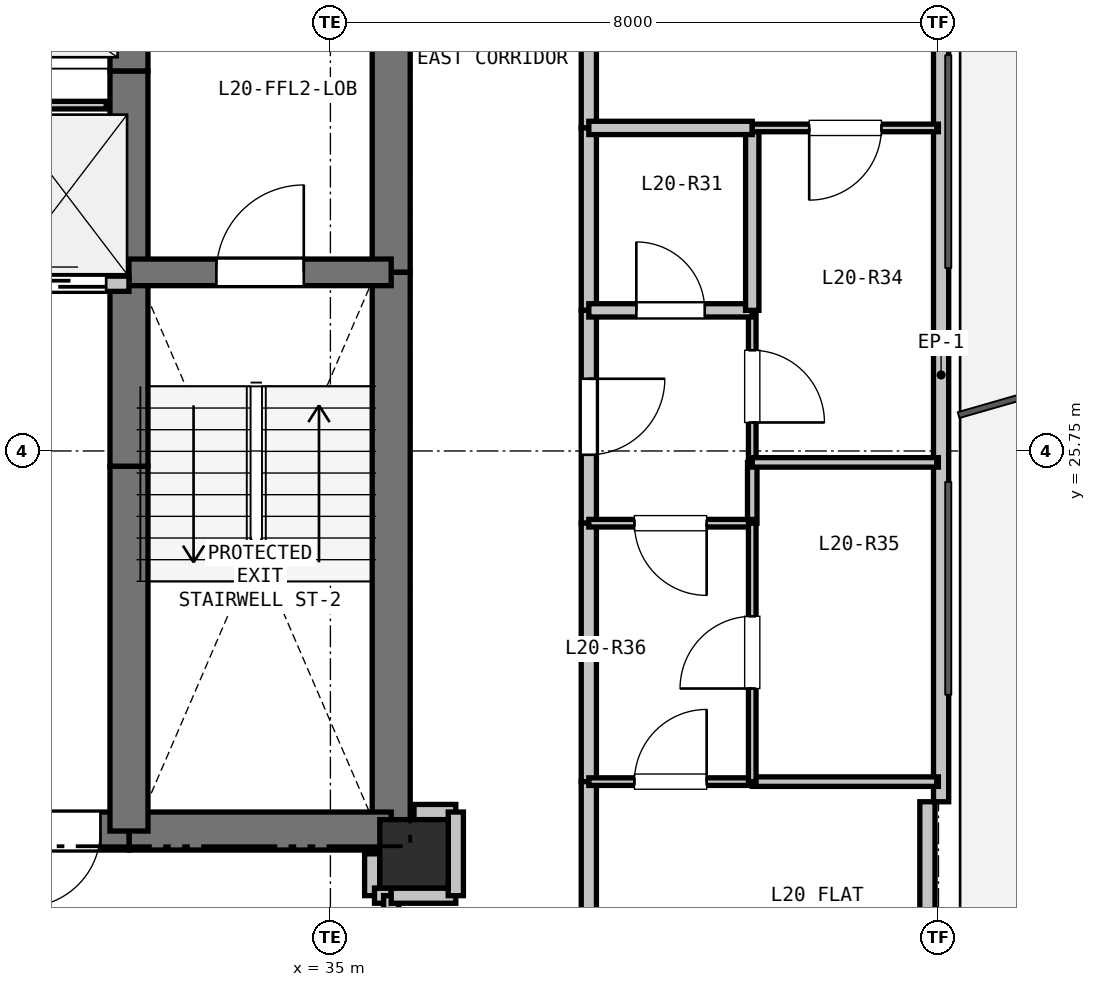
"""IFC4 building model, lengths in metres.
Left out: names, types, materials, properties, quantities, classifications, styles, units other than length and angle.
Written with IfcOpenShell. Run it as: python <this file> out.ifc"""

import sys

from ifc_helpers import new_model, si_unit, direction, frame, frame_2d, origin, origin_2d, place, context, subcontext, project, spatial, rectangle, extrude, element, fill, save


model = new_model("IFC4")
c1 = context("Model", 3, precision=1e-05, world=origin(), true_north=direction((0.0, 1.0)))
c2 = subcontext(c1, "Body", "Model", "MODEL_VIEW")
j1 = project(units=[si_unit("LENGTHUNIT", "METRE"), si_unit("PLANEANGLEUNIT", "RADIAN")], contexts=[c1])
p1 = place(None, origin())
s1 = spatial("IfcSite", under=j1, at=p1, CompositionType="ELEMENT")
p2 = place(p1, origin())
s2 = spatial("IfcBuilding", under=s1, at=p2, CompositionType="ELEMENT")
p3 = place(p2, frame((0.0, 0.0, 76.8)))
s3 = spatial("IfcBuildingStorey", under=s2, at=p3, CompositionType="ELEMENT", Elevation=76.8)
p4 = place(p3, frame((36.1, 20.45, 0.0), z_axis=(0.0, 0.0, 1.0), x_axis=(1.0, 0.0, 0.0)))
e1 = element("IfcColumn", 1, at=p4, inside=s3, PredefinedType="COLUMN", context=c2, shape_type="SweptSolid", body=[
    extrude(rectangle(XDim=0.9, YDim=0.9, at=origin_2d()), origin(), (0.0, 0.0, 1.0), 3.3),
])
p5 = place(p3, frame((43.035, 32.365, 0.0), z_axis=(0.0, 0.0, 1.0), x_axis=(0.0, -1.0, 0.0)))
e2 = element("IfcWall", 2, at=p5, inside=s3, PredefinedType="PARAPET", context=c2, shape_type="SweptSolid", body=[
    extrude(rectangle(XDim=11.229, YDim=0.2, at=frame_2d((5.615, 0.0))), origin(), (0.0, 0.0, 1.0), 0.2),
])
p6 = place(p3, frame((42.854, 21.135, 0.0), z_axis=(0.0, 0.0, 1.0), x_axis=(0.0, -1.0, 0.0)))
e3 = element("IfcWall", 3, at=p6, inside=s3, PredefinedType="PARAPET", context=c2, shape_type="SweptSolid", body=[
    extrude(rectangle(XDim=1.7, YDim=0.2, at=frame_2d((0.85, 0.0))), origin(), (0.0, 0.0, 1.0), 2.67),
])
p7 = place(p3, frame((35.8, 32.75, 0.0), z_axis=(0.0, 0.0, 1.0), x_axis=(0.0, -1.0, 0.0)))
e4 = element("IfcWall", 4, at=p7, inside=s3, PredefinedType="SHEAR", context=c2, shape_type="SweptSolid", body=[
    extrude(rectangle(XDim=4.65, YDim=0.5, at=frame_2d((2.325, 0.0))), origin(), (0.0, 0.0, 1.0), 3.05),
])
p8 = place(p3, frame((35.8, 28.1, 0.0), z_axis=(0.0, 0.0, 1.0), x_axis=(0.0, -1.0, 0.0)))
e5 = element("IfcWall", 5, at=p8, inside=s3, PredefinedType="SHEAR", context=c2, shape_type="SweptSolid", body=[
    extrude(rectangle(XDim=7.35, YDim=0.5, at=frame_2d((3.675, 0.0))), origin(), (0.0, 0.0, 1.0), 3.05),
])
p9 = place(p3, frame((35.8, 20.75, 0.0), z_axis=(0.0, 0.0, 1.0), x_axis=(-1.0, 0.0, 0.0)))
e6 = element("IfcWall", 6, at=p9, inside=s3, PredefinedType="SHEAR", context=c2, shape_type="SweptSolid", body=[
    extrude(rectangle(XDim=3.45, YDim=0.5, at=frame_2d((1.725, 0.0))), origin(), (0.0, 0.0, 1.0), 3.05),
])
p10 = place(p3, frame((32.35, 20.75, 0.0), z_axis=(0.0, 0.0, 1.0), x_axis=(-1.0, 0.0, 0.0)))
e7 = element("IfcWall", 7, at=p10, inside=s3, PredefinedType="SHEAR", context=c2, shape_type="SweptSolid", body=[
    extrude(rectangle(XDim=1.75, YDim=0.5, at=frame_2d((0.875, 0.0))), origin(), (0.0, 0.0, 1.0), 3.05),
])
p11 = place(p10, frame((0.375, 0.0, 0.0)))
e8 = element("IfcOpeningElement", 8, at=p11, cuts=e7, PredefinedType="OPENING", context=c2, shape_type="SweptSolid", body=[
    extrude(rectangle(XDim=1.0, YDim=2.15, at=frame_2d((0.5, 1.075))), frame((0.0, 0.26, 0.0), z_axis=(0.0, -1.0, 0.0), x_axis=(1.0, 0.0, 0.0)), (0.0, 0.0, 1.0), 0.52),
])
p12 = place(p3, frame((32.35, 20.75, 0.0), z_axis=(0.0, 0.0, 1.0), x_axis=(0.0, 1.0, 0.0)))
e9 = element("IfcWall", 9, at=p12, inside=s3, PredefinedType="SHEAR", context=c2, shape_type="SweptSolid", body=[
    extrude(rectangle(XDim=4.8, YDim=0.5, at=frame_2d((2.4, 0.0))), origin(), (0.0, 0.0, 1.0), 3.05),
])
p13 = place(p3, frame((32.35, 25.55, 0.0), z_axis=(0.0, 0.0, 1.0), x_axis=(0.0, 1.0, 0.0)))
e10 = element("IfcWall", 10, at=p13, inside=s3, PredefinedType="SHEAR", context=c2, shape_type="SweptSolid", body=[
    extrude(rectangle(XDim=2.4, YDim=0.5, at=frame_2d((1.2, 0.0))), origin(), (0.0, 0.0, 1.0), 3.05),
])
p14 = place(p3, frame((32.35, 27.95, 0.0), z_axis=(0.0, 0.0, 1.0), x_axis=(0.0, 1.0, 0.0)))
e11 = element("IfcWall", 11, at=p14, inside=s3, PredefinedType="SHEAR", context=c2, shape_type="SweptSolid", body=[
    extrude(rectangle(XDim=2.8, YDim=0.5, at=frame_2d((1.4, 0.0))), origin(), (0.0, 0.0, 1.0), 3.05),
])
p15 = place(p3, frame((32.35, 30.75, 0.0), z_axis=(0.0, 0.0, 1.0), x_axis=(0.0, 1.0, 0.0)))
e12 = element("IfcWall", 12, at=p15, inside=s3, PredefinedType="SHEAR", context=c2, shape_type="SweptSolid", body=[
    extrude(rectangle(XDim=2.0, YDim=0.5, at=frame_2d((1.0, 0.0))), origin(), (0.0, 0.0, 1.0), 3.05),
])
p16 = place(p15, frame((0.45, 0.0, 0.0)))
e13 = element("IfcOpeningElement", 13, at=p16, cuts=e12, PredefinedType="OPENING", context=c2, shape_type="SweptSolid", body=[
    extrude(rectangle(XDim=1.1, YDim=2.15, at=frame_2d((0.55, 1.075))), frame((0.0, 0.26, 0.0), z_axis=(0.0, -1.0, 0.0), x_axis=(1.0, 0.0, 0.0)), (0.0, 0.0, 1.0), 0.52),
])
p17 = place(p3, frame((32.35, 28.1, 0.0), z_axis=(0.0, 0.0, 1.0), x_axis=(1.0, 0.0, 0.0)))
e14 = element("IfcWall", 14, at=p17, inside=s3, PredefinedType="SHEAR", context=c2, shape_type="SweptSolid", body=[
    extrude(rectangle(XDim=3.45, YDim=0.35, at=frame_2d((1.725, 0.0))), origin(), (0.0, 0.0, 1.0), 3.05),
])
p18 = place(p17, frame((1.15, 0.0, 0.0)))
e15 = element("IfcOpeningElement", 15, at=p18, cuts=e14, PredefinedType="OPENING", context=c2, shape_type="SweptSolid", body=[
    extrude(rectangle(XDim=1.15, YDim=2.15, at=frame_2d((0.575, 1.075))), frame((0.0, 0.185, 0.0), z_axis=(0.0, -1.0, 0.0), x_axis=(1.0, 0.0, 0.0)), (0.0, 0.0, 1.0), 0.37),
])
p19 = place(p3, frame((27.4, 27.95, 0.0), z_axis=(0.0, 0.0, 1.0), x_axis=(1.0, 0.0, 0.0)))
e16 = element("IfcWall", 16, at=p19, inside=s3, PredefinedType="PARTITIONING", context=c2, shape_type="SweptSolid", body=[
    extrude(rectangle(XDim=4.95, YDim=0.2, at=frame_2d((2.475, 0.0))), origin(), (0.0, 0.0, 1.0), 3.05),
])
p20 = place(p19, frame((0.25, 0.0, 0.0)))
e17 = element("IfcOpeningElement", 17, at=p20, cuts=e16, PredefinedType="OPENING", context=c2, shape_type="SweptSolid", body=[
    extrude(rectangle(XDim=1.1, YDim=2.15, at=frame_2d((0.55, 1.075))), frame((0.0, 0.11, 0.0), z_axis=(0.0, -1.0, 0.0), x_axis=(1.0, 0.0, 0.0)), (0.0, 0.0, 1.0), 0.22),
])
p21 = place(p19, frame((1.9, 0.0, 0.0)))
e18 = element("IfcOpeningElement", 18, at=p21, cuts=e16, PredefinedType="OPENING", context=c2, shape_type="SweptSolid", body=[
    extrude(rectangle(XDim=1.1, YDim=2.15, at=frame_2d((0.55, 1.075))), frame((0.0, 0.11, 0.0), z_axis=(0.0, -1.0, 0.0), x_axis=(1.0, 0.0, 0.0)), (0.0, 0.0, 1.0), 0.22),
])
p22 = place(p19, frame((3.55, 0.0, 0.0)))
e19 = element("IfcOpeningElement", 19, at=p22, cuts=e16, PredefinedType="OPENING", context=c2, shape_type="SweptSolid", body=[
    extrude(rectangle(XDim=1.1, YDim=2.15, at=frame_2d((0.55, 1.075))), frame((0.0, 0.11, 0.0), z_axis=(0.0, -1.0, 0.0), x_axis=(1.0, 0.0, 0.0)), (0.0, 0.0, 1.0), 0.22),
])
p23 = place(p3, frame((32.05, 30.3, 0.0), z_axis=(0.0, 0.0, 1.0), x_axis=(-1.0, 0.0, 0.0)))
e20 = element("IfcWall", 20, at=p23, inside=s3, PredefinedType="PARTITIONING", context=c2, shape_type="SweptSolid", body=[
    extrude(rectangle(XDim=1.35, YDim=0.1, at=frame_2d((0.675, 0.0))), origin(), (0.0, 0.0, 1.0), 3.05),
])
p24 = place(p3, frame((35.55, 20.45, 0.0), z_axis=(0.0, 0.0, 1.0), x_axis=(0.0, -1.0, 0.0)))
e21 = element("IfcWall", 21, at=p24, inside=s3, PredefinedType="PARTITIONING", context=c2, shape_type="SweptSolid", body=[
    extrude(rectangle(XDim=0.55, YDim=0.2, at=frame_2d((0.275, 0.0))), origin(), (0.0, 0.0, 1.0), 2.498),
])
p25 = place(p3, frame((35.58, 19.9, 0.0), z_axis=(0.0, 0.0, 1.0), x_axis=(1.0, 0.0, 0.0)))
e22 = element("IfcWall", 22, at=p25, inside=s3, PredefinedType="PARTITIONING", context=c2, shape_type="SweptSolid", body=[
    extrude(rectangle(XDim=0.22, YDim=0.2, at=frame_2d((0.11, 0.0))), origin(), (0.0, 0.0, 1.0), 3.05),
])
p26 = place(p3, frame((35.8, 19.9, 0.0), z_axis=(0.0, 0.0, 1.0), x_axis=(0.0, -1.0, 0.0)))
e23 = element("IfcWall", 23, at=p26, inside=s3, PredefinedType="PARTITIONING", context=c2, shape_type="SweptSolid", body=[
    extrude(rectangle(XDim=1.75, YDim=0.2, at=frame_2d((0.875, 0.0))), origin(), (0.0, 0.0, 1.0), 3.05),
])
p27 = place(p26, frame((0.375, 0.0, 0.0)))
e24 = element("IfcOpeningElement", 24, at=p27, cuts=e23, PredefinedType="OPENING", context=c2, shape_type="SweptSolid", body=[
    extrude(rectangle(XDim=1.0, YDim=2.15, at=frame_2d((0.5, 1.075))), frame((0.0, 0.11, 0.0), z_axis=(0.0, -1.0, 0.0), x_axis=(1.0, 0.0, 0.0)), (0.0, 0.0, 1.0), 0.22),
])
p28 = place(p3, frame((36.65, 21.0, 0.0), z_axis=(0.0, 0.0, 1.0), x_axis=(-1.0, 0.0, 0.0)))
e25 = element("IfcWall", 25, at=p28, inside=s3, PredefinedType="PARTITIONING", context=c2, shape_type="SweptSolid", body=[
    extrude(rectangle(XDim=0.55, YDim=0.2, at=frame_2d((0.275, 0.0))), origin(), (0.0, 0.0, 1.0), 2.498),
])
p29 = place(p3, frame((38.4, 35.35, 0.0), z_axis=(0.0, 0.0, 1.0), x_axis=(0.0, -1.0, 0.0)))
e26 = element("IfcWall", 26, at=p29, inside=s3, PredefinedType="PARTITIONING", context=c2, shape_type="SweptSolid", body=[
    extrude(rectangle(XDim=5.35, YDim=0.2, at=frame_2d((2.675, 0.0))), origin(), (0.0, 0.0, 1.0), 3.05),
])
p30 = place(p3, frame((38.4, 30.0, 0.0), z_axis=(0.0, 0.0, 1.0), x_axis=(0.0, -1.0, 0.0)))
e27 = element("IfcWall", 27, at=p30, inside=s3, PredefinedType="PARTITIONING", context=c2, shape_type="SweptSolid", body=[
    extrude(rectangle(XDim=2.4, YDim=0.2, at=frame_2d((1.2, 0.0))), origin(), (0.0, 0.0, 1.0), 3.05),
])
p31 = place(p3, frame((38.4, 27.6, 0.0), z_axis=(0.0, 0.0, 1.0), x_axis=(0.0, -1.0, 0.0)))
e28 = element("IfcWall", 28, at=p31, inside=s3, PredefinedType="PARTITIONING", context=c2, shape_type="SweptSolid", body=[
    extrude(rectangle(XDim=2.8, YDim=0.2, at=frame_2d((1.4, 0.0))), origin(), (0.0, 0.0, 1.0), 3.05),
])
p32 = place(p31, frame((0.9, 0.0, 0.0)))
e29 = element("IfcOpeningElement", 29, at=p32, cuts=e28, PredefinedType="OPENING", context=c2, shape_type="SweptSolid", body=[
    extrude(rectangle(XDim=1.0, YDim=2.15, at=frame_2d((0.5, 1.075))), frame((0.0, 0.11, 0.0), z_axis=(0.0, -1.0, 0.0), x_axis=(1.0, 0.0, 0.0)), (0.0, 0.0, 1.0), 0.22),
])
p33 = place(p3, frame((38.4, 24.8, 0.0), z_axis=(0.0, 0.0, 1.0), x_axis=(0.0, -1.0, 0.0)))
e30 = element("IfcWall", 30, at=p33, inside=s3, PredefinedType="PARTITIONING", context=c2, shape_type="SweptSolid", body=[
    extrude(rectangle(XDim=3.4, YDim=0.2, at=frame_2d((1.7, 0.0))), origin(), (0.0, 0.0, 1.0), 3.05),
])
p34 = place(p3, frame((38.4, 21.4, 0.0), z_axis=(0.0, 0.0, 1.0), x_axis=(0.0, -1.0, 0.0)))
e31 = element("IfcWall", 31, at=p34, inside=s3, PredefinedType="PARTITIONING", context=c2, shape_type="SweptSolid", body=[
    extrude(rectangle(XDim=3.25, YDim=0.2, at=frame_2d((1.625, 0.0))), origin(), (0.0, 0.0, 1.0), 3.05),
])
p35 = place(p3, frame((35.8, 19.9, 0.0), z_axis=(0.0, 0.0, 1.0), x_axis=(1.0, 0.0, 0.0)))
e32 = element("IfcWall", 32, at=p35, inside=s3, PredefinedType="PARTITIONING", context=c2, shape_type="SweptSolid", body=[
    extrude(rectangle(XDim=0.85, YDim=0.2, at=frame_2d((0.425, 0.0))), origin(), (0.0, 0.0, 1.0), 2.423),
])
p36 = place(p3, frame((36.65, 19.9, 0.0), z_axis=(0.0, 0.0, 1.0), x_axis=(0.0, 1.0, 0.0)))
e33 = element("IfcWall", 33, at=p36, inside=s3, PredefinedType="PARTITIONING", context=c2, shape_type="SweptSolid", body=[
    extrude(rectangle(XDim=1.1, YDim=0.2, at=frame_2d((0.55, 0.0))), origin(), (0.0, 0.0, 1.0), 3.05),
])
p37 = place(p3, frame((40.55, 27.6, 0.0), z_axis=(0.0, 0.0, 1.0), x_axis=(0.0, -1.0, 0.0)))
e34 = element("IfcWall", 34, at=p37, inside=s3, PredefinedType="PARTITIONING", context=c2, shape_type="SweptSolid", body=[
    extrude(rectangle(XDim=2.0, YDim=0.1, at=frame_2d((1.0, 0.0))), origin(), (0.0, 0.0, 1.0), 3.05),
])
p38 = place(p37, frame((0.525, 0.0, 0.0)))
e35 = element("IfcOpeningElement", 35, at=p38, cuts=e34, PredefinedType="OPENING", context=c2, shape_type="SweptSolid", body=[
    extrude(rectangle(XDim=0.95, YDim=2.1, at=frame_2d((0.475, 1.05))), frame((0.0, 0.06, 0.0), z_axis=(0.0, -1.0, 0.0), x_axis=(1.0, 0.0, 0.0)), (0.0, 0.0, 1.0), 0.12),
])
p39 = place(p3, frame((40.55, 25.6, 0.0), z_axis=(0.0, 0.0, 1.0), x_axis=(0.0, -1.0, 0.0)))
e36 = element("IfcWall", 36, at=p39, inside=s3, PredefinedType="PARTITIONING", context=c2, shape_type="SweptSolid", body=[
    extrude(rectangle(XDim=0.8, YDim=0.125, at=frame_2d((0.4, 0.0))), origin(), (0.0, 0.0, 1.0), 3.05),
])
p40 = place(p3, frame((40.55, 24.8, 0.0), z_axis=(0.0, 0.0, 1.0), x_axis=(-1.0, 0.0, 0.0)))
e37 = element("IfcWall", 37, at=p40, inside=s3, PredefinedType="PARTITIONING", context=c2, shape_type="SweptSolid", body=[
    extrude(rectangle(XDim=2.15, YDim=0.1, at=frame_2d((1.075, 0.0))), origin(), (0.0, 0.0, 1.0), 3.05),
])
p41 = place(p40, frame((0.6, 0.0, 0.0)))
e38 = element("IfcOpeningElement", 38, at=p41, cuts=e37, PredefinedType="OPENING", context=c2, shape_type="SweptSolid", body=[
    extrude(rectangle(XDim=0.95, YDim=2.1, at=frame_2d((0.475, 1.05))), frame((0.0, 0.06, 0.0), z_axis=(0.0, -1.0, 0.0), x_axis=(1.0, 0.0, 0.0)), (0.0, 0.0, 1.0), 0.12),
])
p42 = place(p3, frame((38.4, 27.6, 0.0), z_axis=(0.0, 0.0, 1.0), x_axis=(1.0, 0.0, 0.0)))
e39 = element("IfcWall", 39, at=p42, inside=s3, PredefinedType="PLUMBINGWALL", context=c2, shape_type="SweptSolid", body=[
    extrude(rectangle(XDim=2.15, YDim=0.175, at=frame_2d((1.075, 0.0))), origin(), (0.0, 0.0, 1.0), 3.05),
])
p43 = place(p42, frame((0.625, 0.0, 0.0)))
e40 = element("IfcOpeningElement", 40, at=p43, cuts=e39, PredefinedType="OPENING", context=c2, shape_type="SweptSolid", body=[
    extrude(rectangle(XDim=0.9, YDim=2.1, at=frame_2d((0.45, 1.05))), frame((0.0, 0.097, 0.0), z_axis=(0.0, -1.0, 0.0), x_axis=(1.0, 0.0, 0.0)), (0.0, 0.0, 1.0), 0.195),
])
p44 = place(p3, frame((40.55, 30.0, 0.0), z_axis=(0.0, 0.0, 1.0), x_axis=(0.0, -1.0, 0.0)))
e41 = element("IfcWall", 41, at=p44, inside=s3, PredefinedType="PLUMBINGWALL", context=c2, shape_type="SweptSolid", body=[
    extrude(rectangle(XDim=2.4, YDim=0.175, at=frame_2d((1.2, 0.0))), origin(), (0.0, 0.0, 1.0), 3.05),
])
p45 = place(p3, frame((38.4, 30.0, 0.0), z_axis=(0.0, 0.0, 1.0), x_axis=(1.0, 0.0, 0.0)))
e42 = element("IfcWall", 42, at=p45, inside=s3, PredefinedType="PLUMBINGWALL", context=c2, shape_type="SweptSolid", body=[
    extrude(rectangle(XDim=2.15, YDim=0.175, at=frame_2d((1.075, 0.0))), origin(), (0.0, 0.0, 1.0), 3.05),
])
p46 = place(p3, frame((38.4, 21.4, 0.0), z_axis=(0.0, 0.0, 1.0), x_axis=(1.0, 0.0, 0.0)))
e43 = element("IfcWall", 43, at=p46, inside=s3, PredefinedType="PARTITIONING", context=c2, shape_type="SweptSolid", body=[
    extrude(rectangle(XDim=2.15, YDim=0.1, at=frame_2d((1.075, 0.0))), origin(), (0.0, 0.0, 1.0), 3.05),
])
p47 = place(p46, frame((0.6, 0.0, 0.0)))
e44 = element("IfcOpeningElement", 44, at=p47, cuts=e43, PredefinedType="OPENING", context=c2, shape_type="SweptSolid", body=[
    extrude(rectangle(XDim=0.95, YDim=2.1, at=frame_2d((0.475, 1.05))), frame((0.0, 0.06, 0.0), z_axis=(0.0, -1.0, 0.0), x_axis=(1.0, 0.0, 0.0)), (0.0, 0.0, 1.0), 0.12),
])
p48 = place(p3, frame((40.55, 21.4, 0.0), z_axis=(0.0, 0.0, 1.0), x_axis=(1.0, 0.0, 0.0)))
e45 = element("IfcWall", 45, at=p48, inside=s3, PredefinedType="PARTITIONING", context=c2, shape_type="SweptSolid", body=[
    extrude(rectangle(XDim=2.448, YDim=0.125, at=frame_2d((1.224, 0.0))), origin(), (0.0, 0.0, 1.0), 2.365),
])
p49 = place(p3, frame((42.999, 30.0, 0.0), z_axis=(0.0, 0.0, 1.0), x_axis=(-1.0, 0.0, 0.0)))
e46 = element("IfcWall", 46, at=p49, inside=s3, PredefinedType="PARTITIONING", context=c2, shape_type="SweptSolid", body=[
    extrude(rectangle(XDim=2.448, YDim=0.1, at=frame_2d((1.224, 0.0))), origin(), (0.0, 0.0, 1.0), 2.365),
])
p50 = place(p49, frame((0.749, 0.0, 0.0)))
e47 = element("IfcOpeningElement", 47, at=p50, cuts=e46, PredefinedType="OPENING", context=c2, shape_type="SweptSolid", body=[
    extrude(rectangle(XDim=0.95, YDim=2.1, at=frame_2d((0.475, 1.05))), frame((0.0, 0.06, 0.0), z_axis=(0.0, -1.0, 0.0), x_axis=(1.0, 0.0, 0.0)), (0.0, 0.0, 1.0), 0.12),
])
p51 = place(p3, frame((42.999, 25.6, 0.0), z_axis=(0.0, 0.0, 1.0), x_axis=(-1.0, 0.0, 0.0)))
e48 = element("IfcWall", 48, at=p51, inside=s3, PredefinedType="PARTITIONING", context=c2, shape_type="SweptSolid", body=[
    extrude(rectangle(XDim=2.448, YDim=0.125, at=frame_2d((1.224, 0.0))), origin(), (0.0, 0.0, 1.0), 2.365),
])
p52 = place(p3, frame((40.55, 21.4, 0.0), z_axis=(0.0, 0.0, 1.0), x_axis=(0.0, 1.0, 0.0)))
e49 = element("IfcWall", 49, at=p52, inside=s3, PredefinedType="PARTITIONING", context=c2, shape_type="SweptSolid", body=[
    extrude(rectangle(XDim=3.4, YDim=0.1, at=frame_2d((1.7, 0.0))), origin(), (0.0, 0.0, 1.0), 3.05),
])
p53 = place(p52, frame((1.225, 0.0, 0.0)))
e50 = element("IfcOpeningElement", 50, at=p53, cuts=e49, PredefinedType="OPENING", context=c2, shape_type="SweptSolid", body=[
    extrude(rectangle(XDim=0.95, YDim=2.1, at=frame_2d((0.475, 1.05))), frame((0.0, 0.06, 0.0), z_axis=(0.0, -1.0, 0.0), x_axis=(1.0, 0.0, 0.0)), (0.0, 0.0, 1.0), 0.12),
])
p54 = place(p22, origin())
e51 = element("IfcDoor", 51, at=p54, inside=s3, OperationType="SLIDING_TO_LEFT", PredefinedType="DOOR", context=c2, shape_type="SweptSolid", body=[
    extrude(rectangle(XDim=1.1, YDim=2.15, at=frame_2d((0.55, 1.075))), frame((0.0, 0.025, 0.0), z_axis=(0.0, -1.0, 0.0), x_axis=(1.0, 0.0, 0.0)), (0.0, 0.0, 1.0), 0.05),
])
fill(e19, e51)
p55 = place(p11, origin())
e52 = element("IfcDoor", 52, at=p55, inside=s3, OperationType="SINGLE_SWING_RIGHT", PredefinedType="DOOR", context=c2, shape_type="SweptSolid", body=[
    extrude(rectangle(XDim=1.0, YDim=2.15, at=frame_2d((0.5, 1.075))), frame((0.0, 0.025, 0.0), z_axis=(0.0, -1.0, 0.0), x_axis=(1.0, 0.0, 0.0)), (0.0, 0.0, 1.0), 0.05),
])
fill(e8, e52)
p56 = place(p18, origin())
e53 = element("IfcDoor", 53, at=p56, inside=s3, OperationType="SINGLE_SWING_RIGHT", PredefinedType="DOOR", context=c2, shape_type="SweptSolid", body=[
    extrude(rectangle(XDim=1.15, YDim=2.15, at=frame_2d((0.575, 1.075))), frame((0.0, 0.025, 0.0), z_axis=(0.0, -1.0, 0.0), x_axis=(1.0, 0.0, 0.0)), (0.0, 0.0, 1.0), 0.05),
])
fill(e15, e53)
p57 = place(p32, origin())
e54 = element("IfcDoor", 54, at=p57, inside=s3, OperationType="SINGLE_SWING_LEFT", PredefinedType="DOOR", context=c2, shape_type="SweptSolid", body=[
    extrude(rectangle(XDim=1.0, YDim=2.15, at=frame_2d((0.5, 1.075))), frame((0.0, 0.025, 0.0), z_axis=(0.0, -1.0, 0.0), x_axis=(1.0, 0.0, 0.0)), (0.0, 0.0, 1.0), 0.05),
])
fill(e29, e54)
p58 = place(p43, origin())
e55 = element("IfcDoor", 55, at=p58, inside=s3, OperationType="SINGLE_SWING_LEFT", PredefinedType="DOOR", context=c2, shape_type="SweptSolid", body=[
    extrude(rectangle(XDim=0.9, YDim=2.1, at=frame_2d((0.45, 1.05))), frame((0.0, 0.025, 0.0), z_axis=(0.0, -1.0, 0.0), x_axis=(1.0, 0.0, 0.0)), (0.0, 0.0, 1.0), 0.05),
])
fill(e40, e55)
p59 = place(p38, origin())
e56 = element("IfcDoor", 56, at=p59, inside=s3, OperationType="SINGLE_SWING_RIGHT", PredefinedType="DOOR", context=c2, shape_type="SweptSolid", body=[
    extrude(rectangle(XDim=0.95, YDim=2.1, at=frame_2d((0.475, 1.05))), frame((0.0, 0.025, 0.0), z_axis=(0.0, -1.0, 0.0), x_axis=(1.0, 0.0, 0.0)), (0.0, 0.0, 1.0), 0.05),
])
fill(e35, e56)
p60 = place(p41, origin())
e57 = element("IfcDoor", 57, at=p60, inside=s3, OperationType="SINGLE_SWING_LEFT", PredefinedType="DOOR", context=c2, shape_type="SweptSolid", body=[
    extrude(rectangle(XDim=0.95, YDim=2.1, at=frame_2d((0.475, 1.05))), frame((0.0, 0.025, 0.0), z_axis=(0.0, -1.0, 0.0), x_axis=(1.0, 0.0, 0.0)), (0.0, 0.0, 1.0), 0.05),
])
fill(e38, e57)
p61 = place(p47, origin())
e58 = element("IfcDoor", 58, at=p61, inside=s3, OperationType="SINGLE_SWING_RIGHT", PredefinedType="DOOR", context=c2, shape_type="SweptSolid", body=[
    extrude(rectangle(XDim=0.95, YDim=2.1, at=frame_2d((0.475, 1.05))), frame((0.0, 0.025, 0.0), z_axis=(0.0, -1.0, 0.0), x_axis=(1.0, 0.0, 0.0)), (0.0, 0.0, 1.0), 0.05),
])
fill(e44, e58)
p62 = place(p50, origin())
e59 = element("IfcDoor", 59, at=p62, inside=s3, OperationType="SINGLE_SWING_RIGHT", PredefinedType="DOOR", context=c2, shape_type="SweptSolid", body=[
    extrude(rectangle(XDim=0.95, YDim=2.1, at=frame_2d((0.475, 1.05))), frame((0.0, 0.025, 0.0), z_axis=(0.0, -1.0, 0.0), x_axis=(1.0, 0.0, 0.0)), (0.0, 0.0, 1.0), 0.05),
])
fill(e47, e59)
p63 = place(p53, origin())
e60 = element("IfcDoor", 60, at=p63, inside=s3, OperationType="SINGLE_SWING_LEFT", PredefinedType="DOOR", context=c2, shape_type="SweptSolid", body=[
    extrude(rectangle(XDim=0.95, YDim=2.1, at=frame_2d((0.475, 1.05))), frame((0.0, 0.025, 0.0), z_axis=(0.0, -1.0, 0.0), x_axis=(1.0, 0.0, 0.0)), (0.0, 0.0, 1.0), 0.05),
])
fill(e50, e60)
save(model, sys.argv[1])
